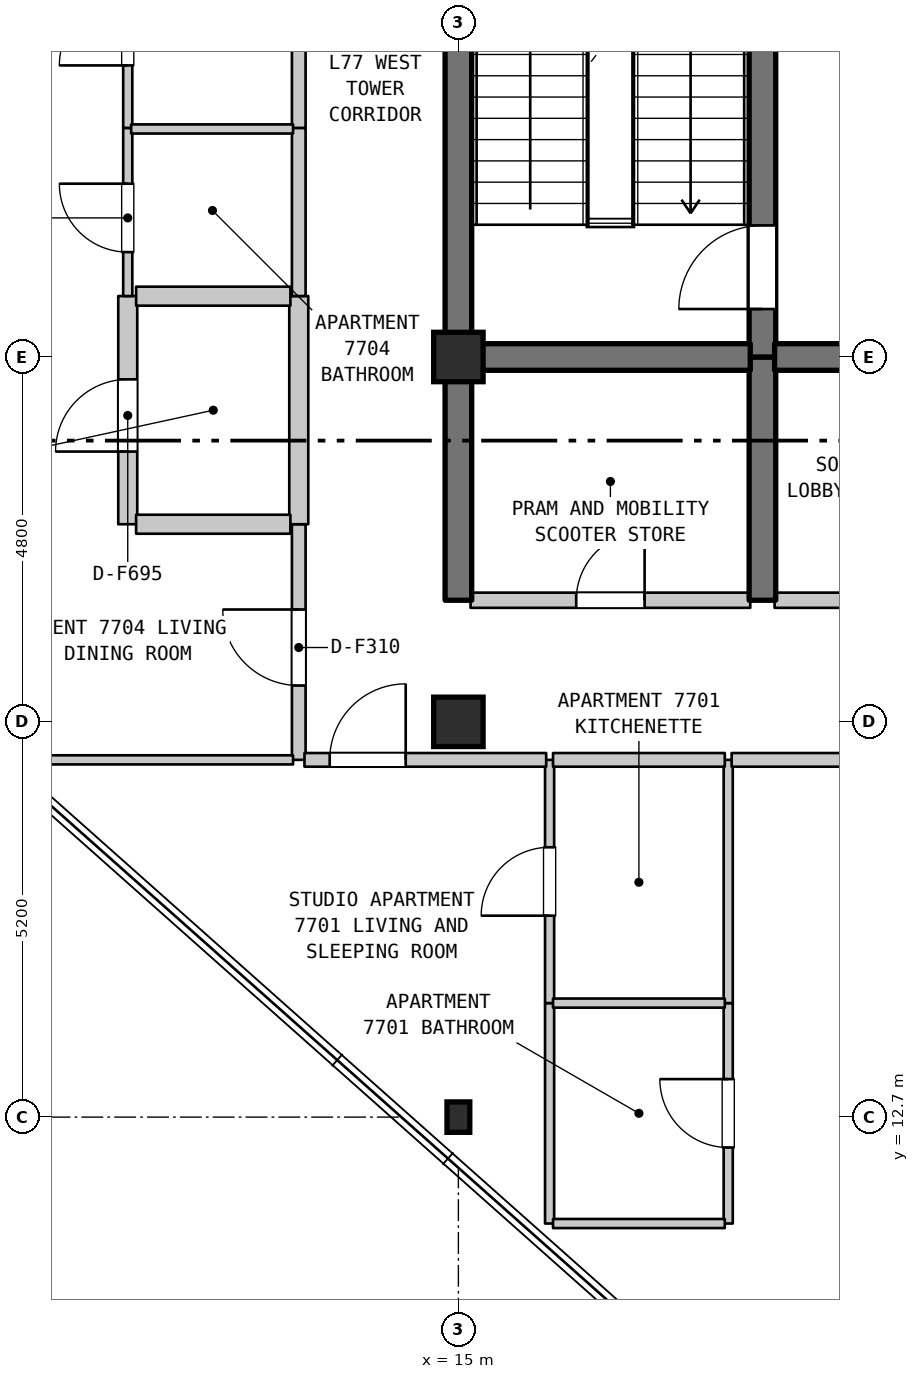
"""IFC4 building model, lengths in metres.
Left out: names, types, materials, properties, quantities, classifications, styles, units other than length and angle.
Written with IfcOpenShell. Run it as: python <this file> out.ifc"""

import sys

from ifc_helpers import new_model, si_unit, direction, frame, frame_2d, origin, origin_2d, place, context, subcontext, project, spatial, rectangle, i_section, extrude, element, fill, save


model = new_model("IFC4")
c1 = context("Model", 3, precision=1e-05, world=origin(), true_north=direction((0.0, 1.0)))
c2 = subcontext(c1, "Body", "Model", "MODEL_VIEW")
j1 = project(units=[si_unit("LENGTHUNIT", "METRE"), si_unit("PLANEANGLEUNIT", "RADIAN")], contexts=[c1])
p1 = place(None, origin())
s1 = spatial("IfcSite", under=j1, at=p1, CompositionType="ELEMENT")
p2 = place(p1, origin())
s2 = spatial("IfcBuilding", under=s1, at=p2, CompositionType="ELEMENT")
p3 = place(p2, frame((0.0, 0.0, 307.3)))
s3 = spatial("IfcBuildingStorey", under=s2, at=p3, CompositionType="ELEMENT", Elevation=307.3)
p4 = place(p3, frame((15.0, 12.7, 0.0), z_axis=(0.0, 0.0, 1.0), x_axis=(1.0, 0.0, 0.0)))
e1 = element("IfcColumn", 1, at=p4, inside=s3, PredefinedType="COLUMN", context=c2, shape_type="SweptSolid", body=[
    extrude(i_section(OverallWidth=0.3, OverallDepth=0.4, WebThickness=0.013, FlangeThickness=0.024, FilletRadius=0.027, at=origin_2d()), origin(), (0.0, 0.0, 1.0), 3.7),
])
for number, where, z_axis, x_axis in (
    (2, (15.0, 17.9, 0.0), (0.0, 0.0, 1.0), (1.0, 0.0, 0.0)),
    (3, (15.0, 22.7, 0.0), (0.0, 0.0, 1.0), (1.0, 0.0, 0.0)),
):
    element("IfcColumn", number, at=place(p3, frame(where, z_axis=z_axis, x_axis=x_axis)), inside=s3, PredefinedType="COLUMN", context=c2, shape_type="SweptSolid", body=[
        extrude(rectangle(XDim=0.65, YDim=0.65, at=origin_2d()), origin(), (0.0, 0.0, 1.0), 3.7),
    ])
p5 = place(p3, frame((10.65, 20.5, 0.0), z_axis=(0.0, 0.0, 1.0), x_axis=(0.0, 1.0, 0.0)))
e4 = element("IfcWall", 4, at=p5, inside=s3, PredefinedType="STANDARD", context=c2, shape_type="SweptSolid", body=[
    extrude(rectangle(XDim=3.002, YDim=0.25, at=frame_2d((1.501, 0.0))), origin(), (0.0, 0.0, 1.0), 3.39),
])
p6 = place(p5, frame((0.956, 0.0, 0.0)))
e5 = element("IfcOpeningElement", 5, at=p6, cuts=e4, PredefinedType="OPENING", context=c2, shape_type="SweptSolid", body=[
    extrude(rectangle(XDim=0.95, YDim=2.15, at=frame_2d((0.475, 1.075))), frame((0.0, 0.135, 0.0), z_axis=(0.0, -1.0, 0.0), x_axis=(1.0, 0.0, 0.0)), (0.0, 0.0, 1.0), 0.27),
])
p7 = place(p3, frame((10.65, 23.502, 0.0), z_axis=(0.0, 0.0, 1.0), x_axis=(0.0, 1.0, 0.0)))
e6 = element("IfcWall", 6, at=p7, inside=s3, PredefinedType="PARTITIONING", context=c2, shape_type="SweptSolid", body=[
    extrude(rectangle(XDim=2.212, YDim=0.12, at=frame_2d((1.106, 0.0))), origin(), (0.0, 0.0, 1.0), 3.39),
])
p8 = place(p7, frame((0.578, 0.0, 0.0)))
e7 = element("IfcOpeningElement", 7, at=p8, cuts=e6, PredefinedType="OPENING", context=c2, shape_type="SweptSolid", body=[
    extrude(rectangle(XDim=0.9, YDim=2.1, at=frame_2d((0.45, 1.05))), frame((0.0, 0.07, 0.0), z_axis=(0.0, -1.0, 0.0), x_axis=(1.0, 0.0, 0.0)), (0.0, 0.0, 1.0), 0.14),
])
p9 = place(p3, frame((10.65, 25.714, 0.0), z_axis=(0.0, 0.0, 1.0), x_axis=(0.0, 1.0, 0.0)))
e8 = element("IfcWall", 8, at=p9, inside=s3, PredefinedType="PARTITIONING", context=c2, shape_type="SweptSolid", body=[
    extrude(rectangle(XDim=2.686, YDim=0.12, at=frame_2d((1.343, 0.0))), origin(), (0.0, 0.0, 1.0), 3.39),
])
p10 = place(p9, frame((0.822, 0.0, 0.0)))
e9 = element("IfcOpeningElement", 9, at=p10, cuts=e8, PredefinedType="OPENING", context=c2, shape_type="SweptSolid", body=[
    extrude(rectangle(XDim=0.9, YDim=2.15, at=frame_2d((0.45, 1.075))), frame((0.0, 0.07, 0.0), z_axis=(0.0, -1.0, 0.0), x_axis=(1.0, 0.0, 0.0)), (0.0, 0.0, 1.0), 0.14),
])
p11 = place(p3, frame((12.9, 17.4, 0.0), z_axis=(0.0, 0.0, 1.0), x_axis=(0.0, 1.0, 0.0)))
e10 = element("IfcWall", 10, at=p11, inside=s3, PredefinedType="STANDARD", context=c2, shape_type="SweptSolid", body=[
    extrude(rectangle(XDim=3.1, YDim=0.18, at=frame_2d((1.55, 0.0))), origin(), (0.0, 0.0, 1.0), 3.39),
])
p12 = place(p11, frame((0.978, 0.0, 0.0)))
e11 = element("IfcOpeningElement", 11, at=p12, cuts=e10, PredefinedType="OPENING", context=c2, shape_type="SweptSolid", body=[
    extrude(rectangle(XDim=1.0, YDim=2.15, at=frame_2d((0.5, 1.075))), frame((0.0, 0.1, 0.0), z_axis=(0.0, -1.0, 0.0), x_axis=(1.0, 0.0, 0.0)), (0.0, 0.0, 1.0), 0.2),
])
p13 = place(p3, frame((12.9, 20.5, 0.0), z_axis=(0.0, 0.0, 1.0), x_axis=(0.0, 1.0, 0.0)))
e12 = element("IfcWall", 12, at=p13, inside=s3, PredefinedType="STANDARD", context=c2, shape_type="SweptSolid", body=[
    extrude(rectangle(XDim=3.002, YDim=0.25, at=frame_2d((1.501, 0.0))), origin(), (0.0, 0.0, 1.0), 3.39),
])
p14 = place(p3, frame((12.9, 23.502, 0.0), z_axis=(0.0, 0.0, 1.0), x_axis=(0.0, 1.0, 0.0)))
e13 = element("IfcWall", 13, at=p14, inside=s3, PredefinedType="STANDARD", context=c2, shape_type="SweptSolid", body=[
    extrude(rectangle(XDim=2.212, YDim=0.18, at=frame_2d((1.106, 0.0))), origin(), (0.0, 0.0, 1.0), 3.39),
])
p15 = place(p3, frame((12.9, 25.714, 0.0), z_axis=(0.0, 0.0, 1.0), x_axis=(0.0, 1.0, 0.0)))
e14 = element("IfcWall", 14, at=p15, inside=s3, PredefinedType="STANDARD", context=c2, shape_type="SweptSolid", body=[
    extrude(rectangle(XDim=2.686, YDim=0.18, at=frame_2d((1.343, 0.0))), origin(), (0.0, 0.0, 1.0), 3.39),
])
p16 = place(p3, frame((15.0, 19.5, 0.0), z_axis=(0.0, 0.0, 1.0), x_axis=(0.0, 1.0, 0.0)))
e15 = element("IfcWall", 15, at=p16, inside=s3, PredefinedType="SHEAR", context=c2, shape_type="SweptSolid", body=[
    extrude(rectangle(XDim=3.2, YDim=0.35, at=frame_2d((1.6, 0.0))), origin(), (0.0, 0.0, 1.0), 3.39),
])
p17 = place(p3, frame((15.0, 22.7, 0.0), z_axis=(0.0, 0.0, 1.0), x_axis=(0.0, 1.0, 0.0)))
e16 = element("IfcWall", 16, at=p17, inside=s3, PredefinedType="SHEAR", context=c2, shape_type="SweptSolid", body=[
    extrude(rectangle(XDim=6.8, YDim=0.35, at=frame_2d((3.4, 0.0))), origin(), (0.0, 0.0, 1.0), 3.39),
])
p18 = place(p3, frame((16.2, 11.3, 0.0), z_axis=(0.0, 0.0, 1.0), x_axis=(0.0, 1.0, 0.0)))
e17 = element("IfcWall", 17, at=p18, inside=s3, PredefinedType="PARTITIONING", context=c2, shape_type="SweptSolid", body=[
    extrude(rectangle(XDim=2.9, YDim=0.12, at=frame_2d((1.45, 0.0))), origin(), (0.0, 0.0, 1.0), 3.39),
])
p19 = place(p3, frame((16.2, 14.2, 0.0), z_axis=(0.0, 0.0, 1.0), x_axis=(0.0, 1.0, 0.0)))
e18 = element("IfcWall", 18, at=p19, inside=s3, PredefinedType="PARTITIONING", context=c2, shape_type="SweptSolid", body=[
    extrude(rectangle(XDim=3.2, YDim=0.12, at=frame_2d((1.6, 0.0))), origin(), (0.0, 0.0, 1.0), 3.39),
])
p20 = place(p19, frame((1.15, 0.0, 0.0)))
e19 = element("IfcOpeningElement", 19, at=p20, cuts=e18, PredefinedType="OPENING", context=c2, shape_type="SweptSolid", body=[
    extrude(rectangle(XDim=0.9, YDim=2.15, at=frame_2d((0.45, 1.075))), frame((0.0, 0.07, 0.0), z_axis=(0.0, -1.0, 0.0), x_axis=(1.0, 0.0, 0.0)), (0.0, 0.0, 1.0), 0.14),
])
p21 = place(p3, frame((18.55, 11.3, 0.0), z_axis=(0.0, 0.0, 1.0), x_axis=(0.0, 1.0, 0.0)))
e20 = element("IfcWall", 20, at=p21, inside=s3, PredefinedType="PARTITIONING", context=c2, shape_type="SweptSolid", body=[
    extrude(rectangle(XDim=2.9, YDim=0.12, at=frame_2d((1.45, 0.0))), origin(), (0.0, 0.0, 1.0), 3.39),
])
p22 = place(p21, frame((1.0, 0.0, 0.0)))
e21 = element("IfcOpeningElement", 21, at=p22, cuts=e20, PredefinedType="OPENING", context=c2, shape_type="SweptSolid", body=[
    extrude(rectangle(XDim=0.9, YDim=2.1, at=frame_2d((0.45, 1.05))), frame((0.0, 0.07, 0.0), z_axis=(0.0, -1.0, 0.0), x_axis=(1.0, 0.0, 0.0)), (0.0, 0.0, 1.0), 0.14),
])
p23 = place(p3, frame((18.55, 14.2, 0.0), z_axis=(0.0, 0.0, 1.0), x_axis=(0.0, 1.0, 0.0)))
e22 = element("IfcWall", 22, at=p23, inside=s3, PredefinedType="PARTITIONING", context=c2, shape_type="SweptSolid", body=[
    extrude(rectangle(XDim=3.2, YDim=0.12, at=frame_2d((1.6, 0.0))), origin(), (0.0, 0.0, 1.0), 3.39),
])
p24 = place(p3, frame((19.0, 19.5, 0.0), z_axis=(0.0, 0.0, 1.0), x_axis=(0.0, 1.0, 0.0)))
e23 = element("IfcWall", 23, at=p24, inside=s3, PredefinedType="SHEAR", context=c2, shape_type="SweptSolid", body=[
    extrude(rectangle(XDim=3.2, YDim=0.35, at=frame_2d((1.6, 0.0))), origin(), (0.0, 0.0, 1.0), 3.39),
])
p25 = place(p3, frame((19.0, 22.7, 0.0), z_axis=(0.0, 0.0, 1.0), x_axis=(0.0, 1.0, 0.0)))
e24 = element("IfcWall", 24, at=p25, inside=s3, PredefinedType="SHEAR", context=c2, shape_type="SweptSolid", body=[
    extrude(rectangle(XDim=5.5, YDim=0.35, at=frame_2d((2.75, 0.0))), origin(), (0.0, 0.0, 1.0), 3.39),
])
p26 = place(p25, frame((0.631, 0.0, 0.0)))
e25 = element("IfcOpeningElement", 25, at=p26, cuts=e24, PredefinedType="OPENING", context=c2, shape_type="SweptSolid", body=[
    extrude(rectangle(XDim=1.1, YDim=2.15, at=frame_2d((0.55, 1.075))), frame((0.0, 0.185, 0.0), z_axis=(0.0, -1.0, 0.0), x_axis=(1.0, 0.0, 0.0)), (0.0, 0.0, 1.0), 0.37),
])
for number, where, z_axis, x_axis in (
    (26, (16.245, 11.3, 0.0), (0.0, 0.0, 1.0), (1.0, 0.0, 0.0)),
    (27, (16.245, 14.2, 0.0), (0.0, 0.0, 1.0), (1.0, 0.0, 0.0)),
):
    element("IfcWall", number, at=place(p3, frame(where, z_axis=z_axis, x_axis=x_axis)), inside=s3, PredefinedType="PARTITIONING", context=c2, shape_type="SweptSolid", body=[
        extrude(rectangle(XDim=2.26, YDim=0.12, at=frame_2d((1.13, 0.0))), origin(), (0.0, 0.0, 1.0), 3.39),
    ])
p27 = place(p3, frame((8.973, 17.4, 0.0), z_axis=(0.0, 0.0, 1.0), x_axis=(1.0, 0.0, 0.0)))
e28 = element("IfcWall", 28, at=p27, inside=s3, PredefinedType="PARTITIONING", context=c2, shape_type="SweptSolid", body=[
    extrude(rectangle(XDim=3.852, YDim=0.12, at=frame_2d((1.926, 0.0))), origin(), (0.0, 0.0, 1.0), 3.39),
])
p28 = place(p3, frame((12.975, 17.4, 0.0), z_axis=(0.0, 0.0, 1.0), x_axis=(1.0, 0.0, 0.0)))
e29 = element("IfcWall", 29, at=p28, inside=s3, PredefinedType="STANDARD", context=c2, shape_type="SweptSolid", body=[
    extrude(rectangle(XDim=3.18, YDim=0.18, at=frame_2d((1.59, 0.0))), origin(), (0.0, 0.0, 1.0), 3.39),
])
p29 = place(p28, frame((0.332, 0.0, 0.0)))
e30 = element("IfcOpeningElement", 30, at=p29, cuts=e29, PredefinedType="OPENING", context=c2, shape_type="SweptSolid", body=[
    extrude(rectangle(XDim=1.0, YDim=2.15, at=frame_2d((0.5, 1.075))), frame((0.0, 0.1, 0.0), z_axis=(0.0, -1.0, 0.0), x_axis=(1.0, 0.0, 0.0)), (0.0, 0.0, 1.0), 0.2),
])
p30 = place(p3, frame((16.245, 17.4, 0.0), z_axis=(0.0, 0.0, 1.0), x_axis=(1.0, 0.0, 0.0)))
e31 = element("IfcWall", 31, at=p30, inside=s3, PredefinedType="STANDARD", context=c2, shape_type="SweptSolid", body=[
    extrude(rectangle(XDim=2.26, YDim=0.18, at=frame_2d((1.13, 0.0))), origin(), (0.0, 0.0, 1.0), 3.39),
])
p31 = place(p3, frame((18.595, 17.4, 0.0), z_axis=(0.0, 0.0, 1.0), x_axis=(1.0, 0.0, 0.0)))
e32 = element("IfcWall", 32, at=p31, inside=s3, PredefinedType="STANDARD", context=c2, shape_type="SweptSolid", body=[
    extrude(rectangle(XDim=1.86, YDim=0.18, at=frame_2d((0.93, 0.0))), origin(), (0.0, 0.0, 1.0), 3.39),
])
p32 = place(p3, frame((15.16, 19.5, 0.0), z_axis=(0.0, 0.0, 1.0), x_axis=(1.0, 0.0, 0.0)))
e33 = element("IfcWall", 33, at=p32, inside=s3, PredefinedType="STANDARD", context=c2, shape_type="SweptSolid", body=[
    extrude(rectangle(XDim=3.68, YDim=0.2, at=frame_2d((1.84, 0.0))), origin(), (0.0, 0.0, 1.0), 3.39),
])
p33 = place(p32, frame((1.39, 0.0, 0.0)))
e34 = element("IfcOpeningElement", 34, at=p33, cuts=e33, PredefinedType="OPENING", context=c2, shape_type="SweptSolid", body=[
    extrude(rectangle(XDim=0.9, YDim=2.15, at=frame_2d((0.45, 1.075))), frame((0.0, 0.11, 0.0), z_axis=(0.0, -1.0, 0.0), x_axis=(1.0, 0.0, 0.0)), (0.0, 0.0, 1.0), 0.22),
])
p34 = place(p3, frame((19.16, 19.5, 0.0), z_axis=(0.0, 0.0, 1.0), x_axis=(1.0, 0.0, 0.0)))
e35 = element("IfcWall", 35, at=p34, inside=s3, PredefinedType="STANDARD", context=c2, shape_type="SweptSolid", body=[
    extrude(rectangle(XDim=4.48, YDim=0.2, at=frame_2d((2.24, 0.0))), origin(), (0.0, 0.0, 1.0), 3.39),
])
p35 = place(p34, frame((1.64, 0.0, 0.0)))
e36 = element("IfcOpeningElement", 36, at=p35, cuts=e35, PredefinedType="OPENING", context=c2, shape_type="SweptSolid", body=[
    extrude(rectangle(XDim=1.2, YDim=2.2, at=frame_2d((0.6, 1.1))), frame((0.0, 0.11, 0.0), z_axis=(0.0, -1.0, 0.0), x_axis=(1.0, 0.0, 0.0)), (0.0, 0.0, 1.0), 0.22),
])
p36 = place(p3, frame((10.76, 20.5, 0.0), z_axis=(0.0, 0.0, 1.0), x_axis=(1.0, 0.0, 0.0)))
e37 = element("IfcWall", 37, at=p36, inside=s3, PredefinedType="STANDARD", context=c2, shape_type="SweptSolid", body=[
    extrude(rectangle(XDim=2.03, YDim=0.25, at=frame_2d((1.015, 0.0))), origin(), (0.0, 0.0, 1.0), 3.39),
])
p37 = place(p3, frame((15.16, 22.7, 0.0), z_axis=(0.0, 0.0, 1.0), x_axis=(1.0, 0.0, 0.0)))
e38 = element("IfcWall", 38, at=p37, inside=s3, PredefinedType="SHEAR", context=c2, shape_type="SweptSolid", body=[
    extrude(rectangle(XDim=3.68, YDim=0.35, at=frame_2d((1.84, 0.0))), origin(), (0.0, 0.0, 1.0), 3.39),
])
p38 = place(p3, frame((19.16, 22.7, 0.0), z_axis=(0.0, 0.0, 1.0), x_axis=(1.0, 0.0, 0.0)))
e39 = element("IfcWall", 39, at=p38, inside=s3, PredefinedType="SHEAR", context=c2, shape_type="SweptSolid", body=[
    extrude(rectangle(XDim=4.48, YDim=0.35, at=frame_2d((2.24, 0.0))), origin(), (0.0, 0.0, 1.0), 3.39),
])
p39 = place(p38, frame((1.64, 0.0, 0.0)))
e40 = element("IfcOpeningElement", 40, at=p39, cuts=e39, PredefinedType="OPENING", context=c2, shape_type="SweptSolid", body=[
    extrude(rectangle(XDim=1.2, YDim=2.2, at=frame_2d((0.6, 1.1))), frame((0.0, 0.185, 0.0), z_axis=(0.0, -1.0, 0.0), x_axis=(1.0, 0.0, 0.0)), (0.0, 0.0, 1.0), 0.37),
])
p40 = place(p3, frame((10.76, 23.5, 0.0), z_axis=(0.0, 0.0, 1.0), x_axis=(1.0, 0.0, 0.0)))
e41 = element("IfcWall", 41, at=p40, inside=s3, PredefinedType="STANDARD", context=c2, shape_type="SweptSolid", body=[
    extrude(rectangle(XDim=2.03, YDim=0.25, at=frame_2d((1.015, 0.0))), origin(), (0.0, 0.0, 1.0), 3.39),
])
p41 = place(p3, frame((10.695, 25.7, 0.0), z_axis=(0.0, 0.0, 1.0), x_axis=(1.0, 0.0, 0.0)))
e42 = element("IfcWall", 42, at=p41, inside=s3, PredefinedType="PARTITIONING", context=c2, shape_type="SweptSolid", body=[
    extrude(rectangle(XDim=2.13, YDim=0.12, at=frame_2d((1.065, 0.0))), origin(), (0.0, 0.0, 1.0), 3.39),
])
p42 = place(p6, origin())
e43 = element("IfcDoor", 43, at=p42, inside=s3, OperationType="SINGLE_SWING_LEFT", PredefinedType="DOOR", context=c2, shape_type="SweptSolid", body=[
    extrude(rectangle(XDim=0.95, YDim=2.15, at=frame_2d((0.475, 1.075))), frame((0.0, 0.025, 0.0), z_axis=(0.0, -1.0, 0.0), x_axis=(1.0, 0.0, 0.0)), (0.0, 0.0, 1.0), 0.05),
])
fill(e5, e43)
p43 = place(p8, origin())
e44 = element("IfcDoor", 44, at=p43, inside=s3, OperationType="SINGLE_SWING_RIGHT", PredefinedType="DOOR", context=c2, shape_type="SweptSolid", body=[
    extrude(rectangle(XDim=0.9, YDim=2.1, at=frame_2d((0.45, 1.05))), frame((0.0, 0.025, 0.0), z_axis=(0.0, -1.0, 0.0), x_axis=(1.0, 0.0, 0.0)), (0.0, 0.0, 1.0), 0.05),
])
fill(e7, e44)
p44 = place(p10, origin())
e45 = element("IfcDoor", 45, at=p44, inside=s3, OperationType="SINGLE_SWING_LEFT", PredefinedType="DOOR", context=c2, shape_type="SweptSolid", body=[
    extrude(rectangle(XDim=0.9, YDim=2.15, at=frame_2d((0.45, 1.075))), frame((0.0, 0.025, 0.0), z_axis=(0.0, -1.0, 0.0), x_axis=(1.0, 0.0, 0.0)), (0.0, 0.0, 1.0), 0.05),
])
fill(e9, e45)
p45 = place(p12, origin())
e46 = element("IfcDoor", 46, at=p45, inside=s3, OperationType="SINGLE_SWING_RIGHT", PredefinedType="DOOR", context=c2, shape_type="SweptSolid", body=[
    extrude(rectangle(XDim=1.0, YDim=2.15, at=frame_2d((0.5, 1.075))), frame((0.0, 0.025, 0.0), z_axis=(0.0, -1.0, 0.0), x_axis=(1.0, 0.0, 0.0)), (0.0, 0.0, 1.0), 0.05),
])
fill(e11, e46)
p46 = place(p20, origin())
e47 = element("IfcDoor", 47, at=p46, inside=s3, OperationType="SINGLE_SWING_LEFT", PredefinedType="DOOR", context=c2, shape_type="SweptSolid", body=[
    extrude(rectangle(XDim=0.9, YDim=2.15, at=frame_2d((0.45, 1.075))), frame((0.0, 0.025, 0.0), z_axis=(0.0, -1.0, 0.0), x_axis=(1.0, 0.0, 0.0)), (0.0, 0.0, 1.0), 0.05),
])
fill(e19, e47)
p47 = place(p22, origin())
e48 = element("IfcDoor", 48, at=p47, inside=s3, OperationType="SINGLE_SWING_RIGHT", PredefinedType="DOOR", context=c2, shape_type="SweptSolid", body=[
    extrude(rectangle(XDim=0.9, YDim=2.1, at=frame_2d((0.45, 1.05))), frame((0.0, 0.025, 0.0), z_axis=(0.0, -1.0, 0.0), x_axis=(1.0, 0.0, 0.0)), (0.0, 0.0, 1.0), 0.05),
])
fill(e21, e48)
p48 = place(p26, origin())
e49 = element("IfcDoor", 49, at=p48, inside=s3, OperationType="SINGLE_SWING_LEFT", PredefinedType="DOOR", context=c2, shape_type="SweptSolid", body=[
    extrude(rectangle(XDim=1.1, YDim=2.15, at=frame_2d((0.55, 1.075))), frame((0.0, 0.025, 0.0), z_axis=(0.0, -1.0, 0.0), x_axis=(1.0, 0.0, 0.0)), (0.0, 0.0, 1.0), 0.05),
])
fill(e25, e49)
p49 = place(p29, origin())
e50 = element("IfcDoor", 50, at=p49, inside=s3, OperationType="SINGLE_SWING_RIGHT", PredefinedType="DOOR", context=c2, shape_type="SweptSolid", body=[
    extrude(rectangle(XDim=1.0, YDim=2.15, at=frame_2d((0.5, 1.075))), frame((0.0, 0.025, 0.0), z_axis=(0.0, -1.0, 0.0), x_axis=(1.0, 0.0, 0.0)), (0.0, 0.0, 1.0), 0.05),
])
fill(e30, e50)
p50 = place(p33, origin())
e51 = element("IfcDoor", 51, at=p50, inside=s3, OperationType="SINGLE_SWING_RIGHT", PredefinedType="DOOR", context=c2, shape_type="SweptSolid", body=[
    extrude(rectangle(XDim=0.9, YDim=2.15, at=frame_2d((0.45, 1.075))), frame((0.0, 0.025, 0.0), z_axis=(0.0, -1.0, 0.0), x_axis=(1.0, 0.0, 0.0)), (0.0, 0.0, 1.0), 0.05),
])
fill(e34, e51)
save(model, sys.argv[1])
